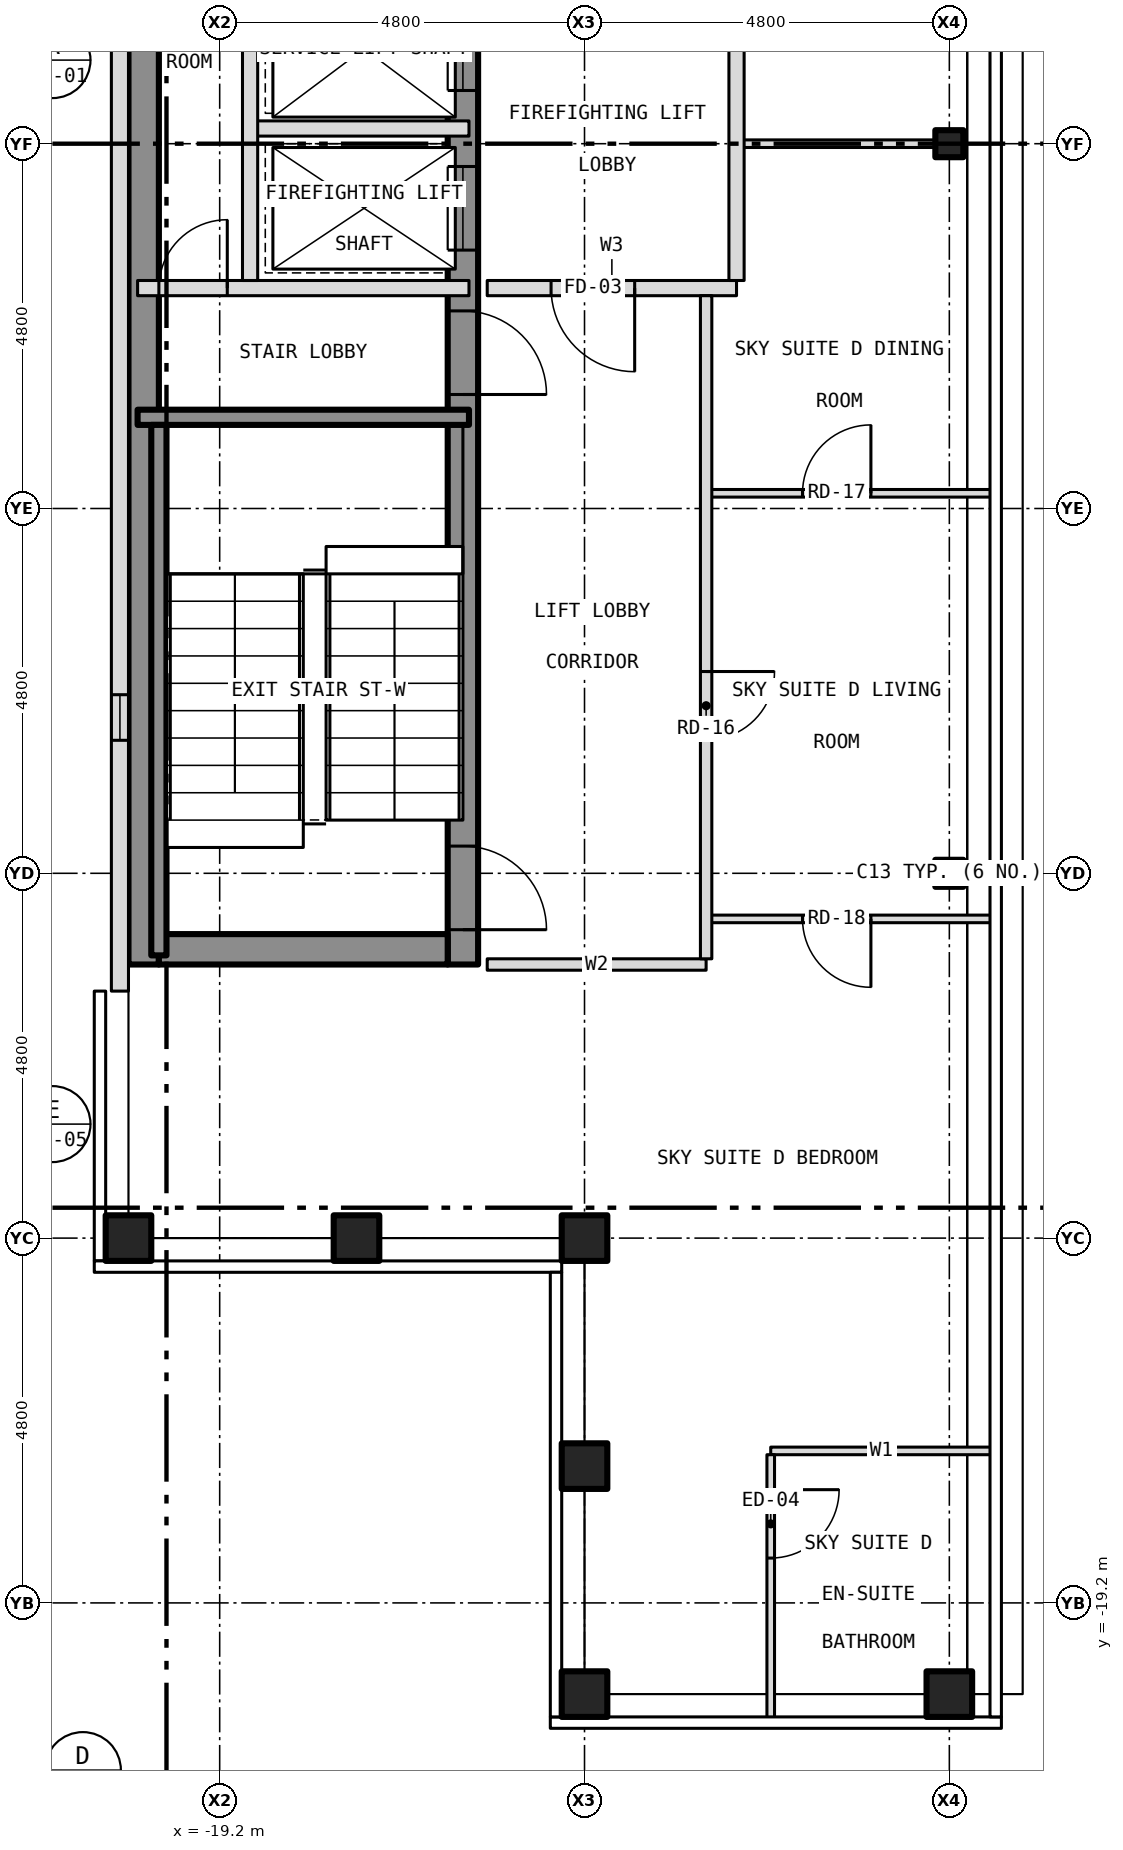
"""IFC4 building model, lengths in metres.
Left out: names, types, materials, properties, quantities, classifications, styles, units other than length and angle.
Written with IfcOpenShell. Run it as: python <this file> out.ifc"""

import sys

from ifc_helpers import new_model, si_unit, direction, frame, frame_2d, origin, origin_2d, place, context, subcontext, project, spatial, rectangle, hollow_rectangle, i_section, extrude, element, fill, save


model = new_model("IFC4")
c1 = context("Model", 3, precision=1e-05, world=origin(), true_north=direction((0.0, 1.0)))
c2 = subcontext(c1, "Body", "Model", "MODEL_VIEW")
j1 = project(units=[si_unit("LENGTHUNIT", "METRE"), si_unit("PLANEANGLEUNIT", "RADIAN")], contexts=[c1])
p1 = place(None, origin())
s1 = spatial("IfcSite", under=j1, at=p1, CompositionType="ELEMENT")
p2 = place(p1, origin())
s2 = spatial("IfcBuilding", under=s1, at=p2, CompositionType="ELEMENT")
p3 = place(p2, frame((0.0, 0.0, 276.0)))
s3 = spatial("IfcBuildingStorey", under=s2, at=p3, CompositionType="ELEMENT", Elevation=276.0)
for number, where, z_axis, x_axis in (
    (1, (-14.4, -20.4, -0.15), (0.0, 0.0, 1.0), (1.0, 0.0, 0.0)),
    (2, (-9.6, -20.4, -0.15), (0.0, 0.0, 1.0), (1.0, 0.0, 0.0)),
    (3, (-20.4, -14.4, -0.15), (0.0, 0.0, 1.0), (1.0, 0.0, 0.0)),
    (4, (-14.4, -14.4, -0.15), (0.0, 0.0, 1.0), (1.0, 0.0, 0.0)),
    (5, (-14.4, -17.4, -0.15), (0.0, 0.0, 1.0), (1.0, 0.0, 0.0)),
    (6, (-17.4, -14.4, -0.15), (0.0, 0.0, 1.0), (1.0, 0.0, 0.0)),
):
    element("IfcColumn", number, at=place(p3, frame(where, z_axis=z_axis, x_axis=x_axis)), inside=s3, PredefinedType="COLUMN", context=c2, shape_type="SweptSolid", body=[
        extrude(hollow_rectangle(XDim=0.6, YDim=0.6, WallThickness=0.03, at=origin_2d()), origin(), (0.0, 0.0, 1.0), 3.5),
    ])
for number, where, z_axis, x_axis in (
    (7, (-9.6, -9.6, -0.15), (0.0, 0.0, 1.0), (1.0, 0.0, 0.0)),
    (8, (-9.6, 0.0, -0.15), (0.0, 0.0, 1.0), (1.0, 0.0, 0.0)),
):
    element("IfcColumn", number, at=place(p3, frame(where, z_axis=z_axis, x_axis=x_axis)), inside=s3, PredefinedType="COLUMN", context=c2, shape_type="SweptSolid", body=[
        extrude(i_section(OverallWidth=0.368, OverallDepth=0.356, WebThickness=0.011, FlangeThickness=0.018, at=origin_2d()), origin(), (0.0, 0.0, 1.0), 3.5),
    ])
p4 = place(p3, frame((-16.0, -10.8, 0.0), z_axis=(0.0, 0.0, 1.0), x_axis=(0.0, 1.0, 0.0)))
e9 = element("IfcWall", 9, at=p4, inside=s3, PredefinedType="SHEAR", context=c2, shape_type="SweptSolid", body=[
    extrude(rectangle(XDim=21.6, YDim=0.4, at=frame_2d((10.8, 0.0))), origin(), (0.0, 0.0, 1.0), 3.25),
])
p5 = place(p4, frame((9.4, 0.0, 0.0)))
e10 = element("IfcOpeningElement", 10, at=p5, cuts=e9, PredefinedType="OPENING", context=c2, shape_type="SweptSolid", body=[
    extrude(rectangle(XDim=1.1, YDim=2.1, at=frame_2d((0.55, 1.05))), frame((0.0, 0.212, 0.0), z_axis=(0.0, -1.0, 0.0), x_axis=(1.0, 0.0, 0.0)), (0.0, 0.0, 1.0), 0.424),
])
p6 = place(p4, frame((11.5, 0.0, 0.0)))
e11 = element("IfcOpeningElement", 11, at=p6, cuts=e9, PredefinedType="OPENING", context=c2, shape_type="SweptSolid", body=[
    extrude(rectangle(XDim=1.1, YDim=2.1, at=frame_2d((0.55, 1.05))), frame((0.0, 0.212, 0.0), z_axis=(0.0, -1.0, 0.0), x_axis=(1.0, 0.0, 0.0)), (0.0, 0.0, 1.0), 0.424),
])
p7 = place(p4, frame((13.6, 0.0, 0.0)))
e12 = element("IfcOpeningElement", 12, at=p7, cuts=e9, PredefinedType="OPENING", context=c2, shape_type="SweptSolid", body=[
    extrude(rectangle(XDim=1.1, YDim=2.1, at=frame_2d((0.55, 1.05))), frame((0.0, 0.212, 0.0), z_axis=(0.0, -1.0, 0.0), x_axis=(1.0, 0.0, 0.0)), (0.0, 0.0, 1.0), 0.424),
])
p8 = place(p4, frame((15.7, 0.0, 0.0)))
e13 = element("IfcOpeningElement", 13, at=p8, cuts=e9, PredefinedType="OPENING", context=c2, shape_type="SweptSolid", body=[
    extrude(rectangle(XDim=1.1, YDim=2.1, at=frame_2d((0.55, 1.05))), frame((0.0, 0.212, 0.0), z_axis=(0.0, -1.0, 0.0), x_axis=(1.0, 0.0, 0.0)), (0.0, 0.0, 1.0), 0.424),
])
p9 = place(p4, frame((17.8, 0.0, 0.0)))
e14 = element("IfcOpeningElement", 14, at=p9, cuts=e9, PredefinedType="OPENING", context=c2, shape_type="SweptSolid", body=[
    extrude(rectangle(XDim=1.1, YDim=2.1, at=frame_2d((0.55, 1.05))), frame((0.0, 0.212, 0.0), z_axis=(0.0, -1.0, 0.0), x_axis=(1.0, 0.0, 0.0)), (0.0, 0.0, 1.0), 0.424),
])
p10 = place(p4, frame((0.458, 0.0, 0.0)))
e15 = element("IfcOpeningElement", 15, at=p10, cuts=e9, PredefinedType="OPENING", context=c2, shape_type="SweptSolid", body=[
    extrude(rectangle(XDim=1.1, YDim=2.1, at=frame_2d((0.55, 1.05))), frame((0.0, 0.212, 0.0), z_axis=(0.0, -1.0, 0.0), x_axis=(1.0, 0.0, 0.0)), (0.0, 0.0, 1.0), 0.424),
])
p11 = place(p4, frame((7.5, 0.0, 0.0)))
e16 = element("IfcOpeningElement", 16, at=p11, cuts=e9, PredefinedType="OPENING", context=c2, shape_type="SweptSolid", body=[
    extrude(rectangle(XDim=1.1, YDim=2.1, at=frame_2d((0.55, 1.05))), frame((0.0, 0.212, 0.0), z_axis=(0.0, -1.0, 0.0), x_axis=(1.0, 0.0, 0.0)), (0.0, 0.0, 1.0), 0.424),
])
p12 = place(p4, frame((20.0, 0.0, 0.0)))
e17 = element("IfcOpeningElement", 17, at=p12, cuts=e9, PredefinedType="OPENING", context=c2, shape_type="SweptSolid", body=[
    extrude(rectangle(XDim=0.9, YDim=2.1, at=frame_2d((0.45, 1.05))), frame((0.0, 0.212, 0.0), z_axis=(0.0, -1.0, 0.0), x_axis=(1.0, 0.0, 0.0)), (0.0, 0.0, 1.0), 0.424),
])
p13 = place(p3, frame((-20.2, -10.8, 0.0), z_axis=(0.0, 0.0, 1.0), x_axis=(0.0, 1.0, 0.0)))
e18 = element("IfcWall", 18, at=p13, inside=s3, PredefinedType="SHEAR", context=c2, shape_type="SweptSolid", body=[
    extrude(rectangle(XDim=21.6, YDim=0.4, at=frame_2d((10.8, 0.0))), origin(), (0.0, 0.0, 1.0), 3.25),
])
p14 = place(p3, frame((-20.0, -10.6, 0.0), z_axis=(0.0, 0.0, 1.0), x_axis=(1.0, 0.0, 0.0)))
e19 = element("IfcWall", 19, at=p14, inside=s3, PredefinedType="SHEAR", context=c2, shape_type="SweptSolid", body=[
    extrude(rectangle(XDim=3.8, YDim=0.4, at=frame_2d((1.9, 0.0))), origin(), (0.0, 0.0, 1.0), 3.25),
])
p15 = place(p3, frame((-20.512, 11.15, 0.0), z_axis=(0.0, 0.0, 1.0), x_axis=(0.0, -1.0, 0.0)))
e20 = element("IfcWall", 20, at=p15, inside=s3, PredefinedType="SOLIDWALL", context=c2, shape_type="SweptSolid", body=[
    extrude(rectangle(XDim=22.3, YDim=0.225, at=frame_2d((11.15, 0.0))), origin(), (0.0, 0.0, 1.0), 3.5),
])
p16 = place(p15, frame((18.4, 0.0, 1.0)))
e21 = element("IfcOpeningElement", 21, at=p16, cuts=e20, PredefinedType="OPENING", context=c2, shape_type="SweptSolid", body=[
    extrude(rectangle(XDim=0.6, YDim=1.5, at=frame_2d((0.3, 0.75))), frame((0.0, 0.125, 0.0), z_axis=(0.0, -1.0, 0.0), x_axis=(1.0, 0.0, 0.0)), (0.0, 0.0, 1.0), 0.249),
])
p17 = place(p3, frame((-11.95, -17.2, 0.0), z_axis=(0.0, 0.0, 1.0), x_axis=(1.0, 0.0, 0.0)))
e22 = element("IfcWall", 22, at=p17, inside=s3, PredefinedType="PARTITIONING", context=c2, shape_type="SweptSolid", body=[
    extrude(rectangle(XDim=2.915, YDim=0.1, at=frame_2d((1.458, 0.0))), origin(), (0.0, 0.0, 1.0), 3.35),
])
p18 = place(p3, frame((-15.68, -10.8, 0.0), z_axis=(0.0, 0.0, 1.0), x_axis=(1.0, 0.0, 0.0)))
e23 = element("IfcWall", 23, at=p18, inside=s3, PredefinedType="PARTITIONING", context=c2, shape_type="SweptSolid", body=[
    extrude(rectangle(XDim=2.88, YDim=0.15, at=frame_2d((1.44, 0.0))), origin(), (0.0, 0.0, 1.0), 3.35),
])
p19 = place(p3, frame((-12.8, -10.2, 0.0), z_axis=(0.0, 0.0, 1.0), x_axis=(1.0, 0.0, 0.0)))
e24 = element("IfcWall", 24, at=p19, inside=s3, PredefinedType="PARTITIONING", context=c2, shape_type="SweptSolid", body=[
    extrude(rectangle(XDim=3.765, YDim=0.1, at=frame_2d((1.883, 0.0))), origin(), (0.0, 0.0, 1.0), 3.35),
])
p20 = place(p19, frame((1.268, 0.0, 0.0)))
e25 = element("IfcOpeningElement", 25, at=p20, cuts=e24, PredefinedType="OPENING", context=c2, shape_type="SweptSolid", body=[
    extrude(rectangle(XDim=0.9, YDim=2.1, at=frame_2d((0.45, 1.05))), frame((0.0, 0.062, 0.0), z_axis=(0.0, -1.0, 0.0), x_axis=(1.0, 0.0, 0.0)), (0.0, 0.0, 1.0), 0.124),
])
p21 = place(p3, frame((-12.8, -4.6, 0.0), z_axis=(0.0, 0.0, 1.0), x_axis=(1.0, 0.0, 0.0)))
e26 = element("IfcWall", 26, at=p21, inside=s3, PredefinedType="PARTITIONING", context=c2, shape_type="SweptSolid", body=[
    extrude(rectangle(XDim=3.765, YDim=0.1, at=frame_2d((1.883, 0.0))), origin(), (0.0, 0.0, 1.0), 3.35),
])
p22 = place(p21, frame((1.268, 0.0, 0.0)))
e27 = element("IfcOpeningElement", 27, at=p22, cuts=e26, PredefinedType="OPENING", context=c2, shape_type="SweptSolid", body=[
    extrude(rectangle(XDim=0.9, YDim=2.1, at=frame_2d((0.45, 1.05))), frame((0.0, 0.062, 0.0), z_axis=(0.0, -1.0, 0.0), x_axis=(1.0, 0.0, 0.0)), (0.0, 0.0, 1.0), 0.124),
])
p23 = place(p3, frame((-20.28, -3.6, 0.0), z_axis=(0.0, 0.0, 1.0), x_axis=(1.0, 0.0, 0.0)))
e28 = element("IfcWall", 28, at=p23, inside=s3, PredefinedType="SHEAR", context=c2, shape_type="SweptSolid", body=[
    extrude(rectangle(XDim=4.36, YDim=0.2, at=frame_2d((2.18, 0.0))), origin(), (0.0, 0.0, 1.0), 3.25),
])
p24 = place(p3, frame((-20.28, -1.9, 0.0), z_axis=(0.0, 0.0, 1.0), x_axis=(1.0, 0.0, 0.0)))
e29 = element("IfcWall", 29, at=p24, inside=s3, PredefinedType="PARTITIONING", context=c2, shape_type="SweptSolid", body=[
    extrude(rectangle(XDim=4.36, YDim=0.2, at=frame_2d((2.18, 0.0))), origin(), (0.0, 0.0, 1.0), 3.25),
])
p25 = place(p24, frame((0.28, 0.0, 0.0)))
e30 = element("IfcOpeningElement", 30, at=p25, cuts=e29, PredefinedType="OPENING", context=c2, shape_type="SweptSolid", body=[
    extrude(rectangle(XDim=0.9, YDim=2.1, at=frame_2d((0.45, 1.05))), frame((0.0, 0.112, 0.0), z_axis=(0.0, -1.0, 0.0), x_axis=(1.0, 0.0, 0.0)), (0.0, 0.0, 1.0), 0.224),
])
p26 = place(p3, frame((-15.68, -1.9, 0.0), z_axis=(0.0, 0.0, 1.0), x_axis=(1.0, 0.0, 0.0)))
e31 = element("IfcWall", 31, at=p26, inside=s3, PredefinedType="PARTITIONING", context=c2, shape_type="SweptSolid", body=[
    extrude(rectangle(XDim=3.28, YDim=0.2, at=frame_2d((1.64, 0.0))), origin(), (0.0, 0.0, 1.0), 3.35),
])
p27 = place(p26, frame((0.84, 0.0, 0.0)))
e32 = element("IfcOpeningElement", 32, at=p27, cuts=e31, PredefinedType="OPENING", context=c2, shape_type="SweptSolid", body=[
    extrude(rectangle(XDim=1.1, YDim=2.1, at=frame_2d((0.55, 1.05))), frame((0.0, 0.112, 0.0), z_axis=(0.0, -1.0, 0.0), x_axis=(1.0, 0.0, 0.0)), (0.0, 0.0, 1.0), 0.224),
])
p28 = place(p3, frame((-12.4, 0.0, 0.0), z_axis=(0.0, 0.0, 1.0), x_axis=(1.0, 0.0, 0.0)))
e33 = element("IfcWall", 33, at=p28, inside=s3, PredefinedType="PARTITIONING", context=c2, shape_type="SweptSolid", body=[
    extrude(rectangle(XDim=2.915, YDim=0.1, at=frame_2d((1.458, 0.0))), origin(), (0.0, 0.0, 1.0), 2.728),
])
p29 = place(p3, frame((-18.8, 0.2, 0.0), z_axis=(0.0, 0.0, 1.0), x_axis=(1.0, 0.0, 0.0)))
e34 = element("IfcWall", 34, at=p29, inside=s3, PredefinedType="PARTITIONING", context=c2, shape_type="SweptSolid", body=[
    extrude(rectangle(XDim=2.88, YDim=0.2, at=frame_2d((1.44, 0.0))), origin(), (0.0, 0.0, 1.0), 3.25),
])
p30 = place(p3, frame((-20.0, -10.68, 0.0), z_axis=(0.0, 0.0, 1.0), x_axis=(0.0, 1.0, 0.0)))
e35 = element("IfcWall", 35, at=p30, inside=s3, PredefinedType="SHEAR", context=c2, shape_type="SweptSolid", body=[
    extrude(rectangle(XDim=6.98, YDim=0.2, at=frame_2d((3.49, 0.0))), origin(), (0.0, 0.0, 1.0), 3.25),
])
p31 = place(p3, frame((-18.8, -1.8, 0.0), z_axis=(0.0, 0.0, 1.0), x_axis=(0.0, 1.0, 0.0)))
e36 = element("IfcWall", 36, at=p31, inside=s3, PredefinedType="PARTITIONING", context=c2, shape_type="SweptSolid", body=[
    extrude(rectangle(XDim=6.1, YDim=0.2, at=frame_2d((3.05, 0.0))), origin(), (0.0, 0.0, 1.0), 3.25),
])
p32 = place(p3, frame((-12.8, -10.725, 0.0), z_axis=(0.0, 0.0, 1.0), x_axis=(0.0, 1.0, 0.0)))
e37 = element("IfcWall", 37, at=p32, inside=s3, PredefinedType="PARTITIONING", context=c2, shape_type="SweptSolid", body=[
    extrude(rectangle(XDim=8.725, YDim=0.15, at=frame_2d((4.363, 0.0))), origin(), (0.0, 0.0, 1.0), 3.35),
])
p33 = place(p32, frame((2.88, 0.0, 0.0)))
e38 = element("IfcOpeningElement", 38, at=p33, cuts=e37, PredefinedType="OPENING", context=c2, shape_type="SweptSolid", body=[
    extrude(rectangle(XDim=0.9, YDim=2.1, at=frame_2d((0.45, 1.05))), frame((0.0, 0.087, 0.0), z_axis=(0.0, -1.0, 0.0), x_axis=(1.0, 0.0, 0.0)), (0.0, 0.0, 1.0), 0.174),
])
p34 = place(p3, frame((-12.4, -1.8, 0.0), z_axis=(0.0, 0.0, 1.0), x_axis=(0.0, 1.0, 0.0)))
e39 = element("IfcWall", 39, at=p34, inside=s3, PredefinedType="PARTITIONING", context=c2, shape_type="SweptSolid", body=[
    extrude(rectangle(XDim=4.0, YDim=0.2, at=frame_2d((2.0, 0.0))), origin(), (0.0, 0.0, 1.0), 3.35),
])
p35 = place(p3, frame((-11.95, -20.73, 0.0), z_axis=(0.0, 0.0, 1.0), x_axis=(0.0, 1.0, 0.0)))
e40 = element("IfcWall", 40, at=p35, inside=s3, PredefinedType="PARTITIONING", context=c2, shape_type="SweptSolid", body=[
    extrude(rectangle(XDim=3.48, YDim=0.1, at=frame_2d((1.74, 0.0))), origin(), (0.0, 0.0, 1.0), 3.35),
])
p36 = place(p35, frame((2.12, 0.0, 0.0)))
e41 = element("IfcOpeningElement", 41, at=p36, cuts=e40, PredefinedType="OPENING", context=c2, shape_type="SweptSolid", body=[
    extrude(rectangle(XDim=0.9, YDim=2.1, at=frame_2d((0.45, 1.05))), frame((0.0, 0.062, 0.0), z_axis=(0.0, -1.0, 0.0), x_axis=(1.0, 0.0, 0.0)), (0.0, 0.0, 1.0), 0.124),
])
p37 = place(p16, origin())
e42 = element("IfcWindow", 42, at=p37, inside=s3, PartitioningType="SINGLE_PANEL", PredefinedType="WINDOW", context=c2, shape_type="SweptSolid", body=[
    extrude(rectangle(XDim=0.6, YDim=1.5, at=frame_2d((0.3, 0.75))), frame((0.0, -0.022, 0.0), z_axis=(0.0, -1.0, 0.0), x_axis=(1.0, 0.0, 0.0)), (0.0, 0.0, 1.0), 0.06),
])
fill(e21, e42)
p38 = place(p5, origin())
e43 = element("IfcDoor", 43, at=p38, inside=s3, OperationType="SLIDING_TO_LEFT", PredefinedType="DOOR", context=c2, shape_type="SweptSolid", body=[
    extrude(rectangle(XDim=1.1, YDim=2.1, at=frame_2d((0.55, 1.05))), frame((0.0, 0.025, 0.0), z_axis=(0.0, -1.0, 0.0), x_axis=(1.0, 0.0, 0.0)), (0.0, 0.0, 1.0), 0.05),
])
fill(e10, e43)
p39 = place(p6, origin())
e44 = element("IfcDoor", 44, at=p39, inside=s3, OperationType="SLIDING_TO_LEFT", PredefinedType="DOOR", context=c2, shape_type="SweptSolid", body=[
    extrude(rectangle(XDim=1.1, YDim=2.1, at=frame_2d((0.55, 1.05))), frame((0.0, 0.025, 0.0), z_axis=(0.0, -1.0, 0.0), x_axis=(1.0, 0.0, 0.0)), (0.0, 0.0, 1.0), 0.05),
])
fill(e11, e44)
p40 = place(p10, origin())
e45 = element("IfcDoor", 45, at=p40, inside=s3, OperationType="SINGLE_SWING_LEFT", PredefinedType="DOOR", context=c2, shape_type="SweptSolid", body=[
    extrude(rectangle(XDim=1.1, YDim=2.1, at=frame_2d((0.55, 1.05))), frame((0.0, 0.025, 0.0), z_axis=(0.0, -1.0, 0.0), x_axis=(1.0, 0.0, 0.0)), (0.0, 0.0, 1.0), 0.05),
])
fill(e15, e45)
p41 = place(p11, origin())
e46 = element("IfcDoor", 46, at=p41, inside=s3, OperationType="SINGLE_SWING_LEFT", PredefinedType="DOOR", context=c2, shape_type="SweptSolid", body=[
    extrude(rectangle(XDim=1.1, YDim=2.1, at=frame_2d((0.55, 1.05))), frame((0.0, 0.025, 0.0), z_axis=(0.0, -1.0, 0.0), x_axis=(1.0, 0.0, 0.0)), (0.0, 0.0, 1.0), 0.05),
])
fill(e16, e46)
p42 = place(p25, origin())
e47 = element("IfcDoor", 47, at=p42, inside=s3, OperationType="SINGLE_SWING_RIGHT", PredefinedType="DOOR", context=c2, shape_type="SweptSolid", body=[
    extrude(rectangle(XDim=0.9, YDim=2.1, at=frame_2d((0.45, 1.05))), frame((0.0, 0.025, 0.0), z_axis=(0.0, -1.0, 0.0), x_axis=(1.0, 0.0, 0.0)), (0.0, 0.0, 1.0), 0.05),
])
fill(e30, e47)
p43 = place(p27, origin())
e48 = element("IfcDoor", 48, at=p43, inside=s3, OperationType="SINGLE_SWING_RIGHT", PredefinedType="DOOR", context=c2, shape_type="SweptSolid", body=[
    extrude(rectangle(XDim=1.1, YDim=2.1, at=frame_2d((0.55, 1.05))), frame((0.0, 0.025, 0.0), z_axis=(0.0, -1.0, 0.0), x_axis=(1.0, 0.0, 0.0)), (0.0, 0.0, 1.0), 0.05),
])
fill(e32, e48)
p44 = place(p33, origin())
e49 = element("IfcDoor", 49, at=p44, inside=s3, OperationType="SINGLE_SWING_RIGHT", PredefinedType="DOOR", context=c2, shape_type="SweptSolid", body=[
    extrude(rectangle(XDim=0.9, YDim=2.1, at=frame_2d((0.45, 1.05))), frame((0.0, 0.025, 0.0), z_axis=(0.0, -1.0, 0.0), x_axis=(1.0, 0.0, 0.0)), (0.0, 0.0, 1.0), 0.05),
])
fill(e38, e49)
p45 = place(p22, origin())
e50 = element("IfcDoor", 50, at=p45, inside=s3, OperationType="SINGLE_SWING_RIGHT", PredefinedType="DOOR", context=c2, shape_type="SweptSolid", body=[
    extrude(rectangle(XDim=0.9, YDim=2.1, at=frame_2d((0.45, 1.05))), frame((0.0, 0.025, 0.0), z_axis=(0.0, -1.0, 0.0), x_axis=(1.0, 0.0, 0.0)), (0.0, 0.0, 1.0), 0.05),
])
fill(e27, e50)
p46 = place(p20, origin())
e51 = element("IfcDoor", 51, at=p46, inside=s3, OperationType="SINGLE_SWING_RIGHT", PredefinedType="DOOR", context=c2, shape_type="SweptSolid", body=[
    extrude(rectangle(XDim=0.9, YDim=2.1, at=frame_2d((0.45, 1.05))), frame((0.0, 0.025, 0.0), z_axis=(0.0, -1.0, 0.0), x_axis=(1.0, 0.0, 0.0)), (0.0, 0.0, 1.0), 0.05),
])
fill(e25, e51)
p47 = place(p36, origin())
e52 = element("IfcDoor", 52, at=p47, inside=s3, OperationType="SINGLE_SWING_RIGHT", PredefinedType="DOOR", context=c2, shape_type="SweptSolid", body=[
    extrude(rectangle(XDim=0.9, YDim=2.1, at=frame_2d((0.45, 1.05))), frame((0.0, 0.025, 0.0), z_axis=(0.0, -1.0, 0.0), x_axis=(1.0, 0.0, 0.0)), (0.0, 0.0, 1.0), 0.05),
])
fill(e41, e52)
save(model, sys.argv[1])
